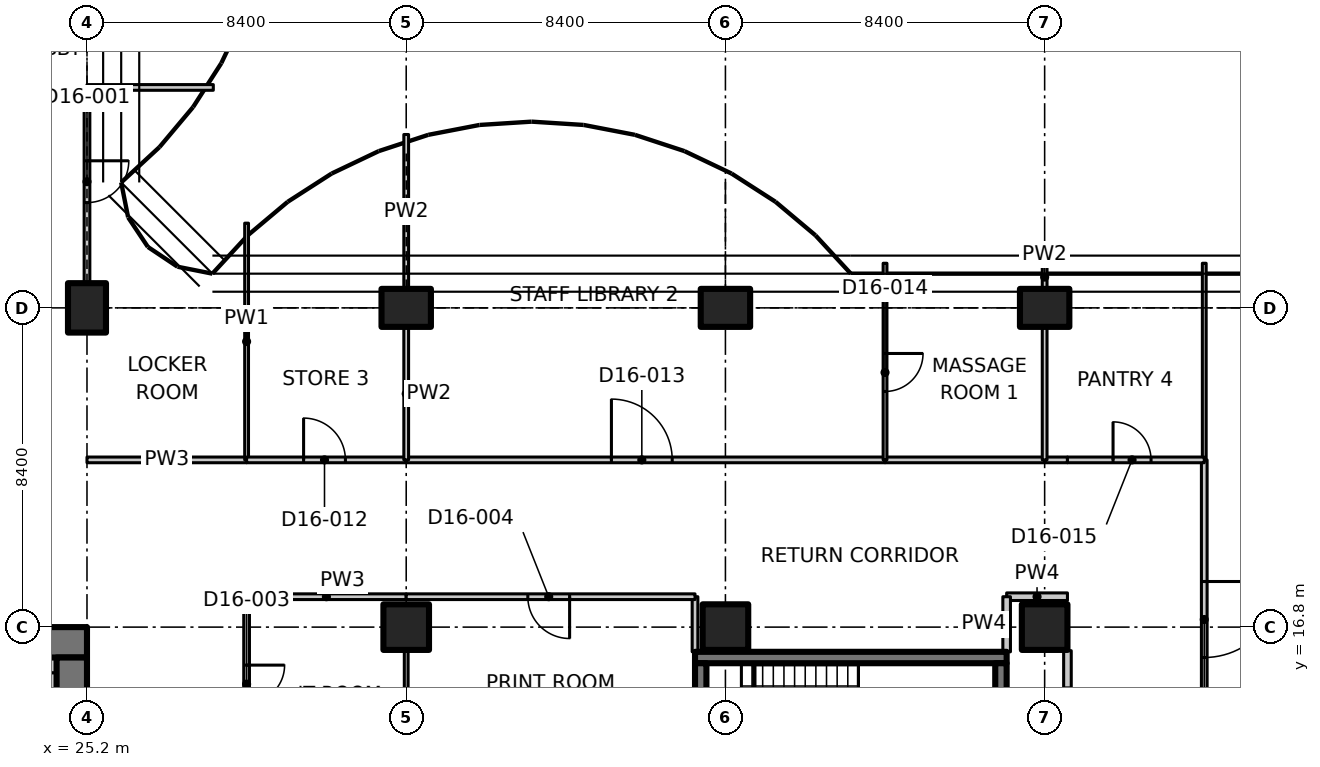
"""IFC4 building model, lengths in metres.
Left out: names, types, materials, properties, quantities, classifications, styles, units other than length and angle.
Written with IfcOpenShell. Run it as: python <this file> out.ifc"""

import sys

from ifc_helpers import new_model, si_unit, direction, frame, frame_2d, origin, origin_2d, place, context, subcontext, project, spatial, polyline, rectangle, outline, extrude, element, fill, save


model = new_model("IFC4")
c1 = context("Model", 3, precision=1e-05, world=origin(), true_north=direction((0.0, 1.0)))
c2 = subcontext(c1, "Body", "Model", "MODEL_VIEW")
j1 = project(units=[si_unit("LENGTHUNIT", "METRE"), si_unit("PLANEANGLEUNIT", "RADIAN")], contexts=[c1])
p1 = place(None, origin())
s1 = spatial("IfcSite", under=j1, at=p1, CompositionType="ELEMENT")
p2 = place(p1, origin())
s2 = spatial("IfcBuilding", under=s1, at=p2, CompositionType="ELEMENT")
p3 = place(p2, frame((0.0, 0.0, 124.1)))
s3 = spatial("IfcBuildingStorey", under=s2, at=p3, CompositionType="ELEMENT", Elevation=124.1)
p4 = place(p3, frame((25.2, 25.2, 0.0), z_axis=(0.0, 0.0, 1.0), x_axis=(1.0, 0.0, 0.0)))
e1 = element("IfcColumn", 1, at=p4, inside=s3, PredefinedType="COLUMN", context=c2, shape_type="SweptSolid", body=[
    extrude(rectangle(XDim=1.0, YDim=1.3, at=origin_2d()), origin(), (0.0, 0.0, 1.0), 3.35),
])
p5 = place(p3, frame((33.6, 16.8, 0.0), z_axis=(0.0, 0.0, 1.0), x_axis=(1.0, 0.0, 0.0)))
e2 = element("IfcColumn", 2, at=p5, inside=s3, PredefinedType="COLUMN", context=c2, shape_type="SweptSolid", body=[
    extrude(rectangle(XDim=1.2, YDim=1.2, at=origin_2d()), origin(), (0.0, 0.0, 1.0), 3.35),
])
p6 = place(p3, frame((33.6, 25.2, 0.0), z_axis=(0.0, 0.0, 1.0), x_axis=(0.0, 1.0, 0.0)))
e3 = element("IfcColumn", 3, at=p6, inside=s3, PredefinedType="COLUMN", context=c2, shape_type="SweptSolid", body=[
    extrude(rectangle(XDim=1.0, YDim=1.3, at=origin_2d()), origin(), (0.0, 0.0, 1.0), 3.35),
])
p7 = place(p3, frame((42.0, 16.8, 0.0), z_axis=(0.0, 0.0, 1.0), x_axis=(1.0, 0.0, 0.0)))
e4 = element("IfcColumn", 4, at=p7, inside=s3, PredefinedType="COLUMN", context=c2, shape_type="SweptSolid", body=[
    extrude(rectangle(XDim=1.2, YDim=1.2, at=origin_2d()), origin(), (0.0, 0.0, 1.0), 3.35),
])
p8 = place(p3, frame((42.0, 25.2, 0.0), z_axis=(0.0, 0.0, 1.0), x_axis=(0.0, 1.0, 0.0)))
e5 = element("IfcColumn", 5, at=p8, inside=s3, PredefinedType="COLUMN", context=c2, shape_type="SweptSolid", body=[
    extrude(rectangle(XDim=1.0, YDim=1.3, at=origin_2d()), origin(), (0.0, 0.0, 1.0), 3.35),
])
p9 = place(p3, frame((50.4, 16.8, 0.0), z_axis=(0.0, 0.0, 1.0), x_axis=(1.0, 0.0, 0.0)))
e6 = element("IfcColumn", 6, at=p9, inside=s3, PredefinedType="COLUMN", context=c2, shape_type="SweptSolid", body=[
    extrude(rectangle(XDim=1.2, YDim=1.2, at=origin_2d()), origin(), (0.0, 0.0, 1.0), 3.35),
])
p10 = place(p3, frame((50.4, 25.2, 0.0), z_axis=(0.0, 0.0, 1.0), x_axis=(0.0, 1.0, 0.0)))
e7 = element("IfcColumn", 7, at=p10, inside=s3, PredefinedType="COLUMN", context=c2, shape_type="SweptSolid", body=[
    extrude(rectangle(XDim=1.0, YDim=1.3, at=origin_2d()), origin(), (0.0, 0.0, 1.0), 3.35),
])
p11 = place(p3, frame((23.8, 16.4, 0.0), z_axis=(0.0, 0.0, 1.0), x_axis=(1.0, 0.0, 0.0)))
e8 = element("IfcWall", 8, at=p11, inside=s3, PredefinedType="SHEAR", context=c2, shape_type="SweptSolid", body=[
    extrude(rectangle(XDim=1.4, YDim=0.8, at=frame_2d((0.7, 0.0))), origin(), (0.0, 0.0, 1.0), 3.35),
])
p12 = place(p3, frame((24.8, 12.6, 0.0), z_axis=(0.0, 0.0, 1.0), x_axis=(0.0, 1.0, 0.0)))
e9 = element("IfcWall", 9, at=p12, inside=s3, PredefinedType="SHEAR", context=c2, shape_type="SweptSolid", body=[
    extrude(rectangle(XDim=3.4, YDim=0.8, at=frame_2d((1.7, 0.0))), origin(), (0.0, 0.0, 1.0), 3.35),
])
p13 = place(p3, frame((24.2, 12.6, 0.0), z_axis=(0.0, 0.0, 1.0), x_axis=(0.0, 1.0, 0.0)))
e10 = element("IfcWall", 10, at=p13, inside=s3, PredefinedType="PARTITIONING", context=c2, shape_type="SweptSolid", body=[
    extrude(rectangle(XDim=3.0, YDim=0.4, at=frame_2d((1.5, 0.0))), origin(), (0.0, 0.0, 1.0), 3.35),
])
p14 = place(p3, frame((23.8, 15.8, 0.0), z_axis=(0.0, 0.0, 1.0), x_axis=(1.0, 0.0, 0.0)))
e11 = element("IfcWall", 11, at=p14, inside=s3, PredefinedType="PARTITIONING", context=c2, shape_type="SweptSolid", body=[
    extrude(rectangle(XDim=0.6, YDim=0.4, at=frame_2d((0.3, 0.0))), origin(), (0.0, 0.0, 1.0), 3.35),
])
p15 = place(p3, frame((41.2, 16.0, 0.0), z_axis=(0.0, 0.0, 1.0), x_axis=(1.0, 0.0, 0.0)))
e12 = element("IfcWall", 12, at=p15, inside=s3, PredefinedType="SHEAR", context=c2, shape_type="SweptSolid", body=[
    extrude(rectangle(XDim=8.2, YDim=0.3, at=frame_2d((4.1, 0.0))), origin(), (0.0, 0.0, 1.0), 3.35),
])
for number, where, z_axis, x_axis in (
    (13, (41.35, 13.3, 0.0), (0.0, 0.0, 1.0), (0.0, 1.0, 0.0)),
    (14, (49.25, 13.3, 0.0), (0.0, 0.0, 1.0), (0.0, 1.0, 0.0)),
):
    element("IfcWall", number, at=place(p3, frame(where, z_axis=z_axis, x_axis=x_axis)), inside=s3, PredefinedType="SHEAR", context=c2, shape_type="SweptSolid", body=[
        extrude(rectangle(XDim=2.55, YDim=0.3, at=frame_2d((1.275, 0.0))), origin(), (0.0, 0.0, 1.0), 3.35),
    ])
p16 = place(p3, frame((25.2, 21.2, 0.0), z_axis=(0.0, 0.0, 1.0), x_axis=(1.0, 0.0, 0.0)))
e15 = element("IfcWall", 15, at=p16, inside=s3, PredefinedType="PARTITIONING", context=c2, shape_type="SweptSolid", body=[
    extrude(rectangle(XDim=4.2, YDim=0.15, at=frame_2d((2.1, 0.0))), origin(), (0.0, 0.0, 1.0), 3.33),
])
p17 = place(p3, frame((29.4, 17.6, 0.0), z_axis=(0.0, 0.0, 1.0), x_axis=(0.0, -1.0, 0.0)))
e16 = element("IfcWall", 16, at=p17, inside=s3, PredefinedType="PARTITIONING", context=c2, shape_type="SweptSolid", body=[
    extrude(rectangle(XDim=4.6, YDim=0.15, at=frame_2d((2.3, 0.0))), origin(), (0.0, 0.0, 1.0), 3.33),
])
p18 = place(p17, frame((1.8, 0.0, 0.0)))
e17 = element("IfcOpeningElement", 17, at=p18, cuts=e16, PredefinedType="OPENING", context=c2, shape_type="SweptSolid", body=[
    extrude(rectangle(XDim=1.0, YDim=2.1, at=frame_2d((0.5, 1.05))), frame((0.0, 0.085, 0.0), z_axis=(0.0, -1.0, 0.0), x_axis=(1.0, 0.0, 0.0)), (0.0, 0.0, 1.0), 0.17),
])
p19 = place(p3, frame((29.4, 27.429, 0.0), z_axis=(0.0, 0.0, 1.0), x_axis=(0.0, -1.0, 0.0)))
e18 = element("IfcWall", 18, at=p19, inside=s3, PredefinedType="PARTITIONING", context=c2, shape_type="SweptSolid", body=[
    extrude(outline(polyline([(0.0, 0.0), (6.229, 0.0), (6.229, 3.33), (2.679, 3.33), (2.677, 2.98), (1.781, 2.98), (1.779, 3.33), (0.154, 3.33), (0.0, 3.33), (0.0, 0.0)])), frame((0.0, 0.05, 0.0), z_axis=(0.0, -1.0, 0.0), x_axis=(1.0, 0.0, 0.0)), (0.0, 0.0, 1.0), 0.1),
])
p20 = place(p3, frame((25.2, 31.0, 0.0), z_axis=(0.0, 0.0, 1.0), x_axis=(0.0, -1.0, 0.0)))
e19 = element("IfcWall", 19, at=p20, inside=s3, PredefinedType="PARTITIONING", context=c2, shape_type="SweptSolid", body=[
    extrude(outline(polyline([(0.0, 0.0), (5.13, 0.0), (5.13, 2.98), (0.0, 2.98), (0.0, 0.0)])), frame((0.0, 0.075, 0.0), z_axis=(0.0, -1.0, 0.0), x_axis=(1.0, 0.0, 0.0)), (0.0, 0.0, 1.0), 0.15),
])
p21 = place(p20, frame((1.93, 0.0, 0.0)))
e20 = element("IfcOpeningElement", 20, at=p21, cuts=e19, PredefinedType="OPENING", context=c2, shape_type="SweptSolid", body=[
    extrude(rectangle(XDim=1.1, YDim=2.1, at=frame_2d((0.55, 1.05))), frame((0.0, 0.085, 0.0), z_axis=(0.0, -1.0, 0.0), x_axis=(1.0, 0.0, 0.0)), (0.0, 0.0, 1.0), 0.17),
])
p22 = place(p3, frame((25.2, 31.0, 0.0), z_axis=(0.0, 0.0, 1.0), x_axis=(1.0, 0.0, 0.0)))
e21 = element("IfcWall", 21, at=p22, inside=s3, PredefinedType="PARTITIONING", context=c2, shape_type="SweptSolid", body=[
    extrude(rectangle(XDim=3.324, YDim=0.15, at=frame_2d((1.662, 0.0))), origin(), (0.0, 0.0, 1.0), 2.98),
])
p23 = place(p3, frame((54.6, 21.2, 0.0), z_axis=(0.0, 0.0, 1.0), x_axis=(0.0, -1.0, 0.0)))
e22 = element("IfcWall", 22, at=p23, inside=s3, PredefinedType="PARTITIONING", context=c2, shape_type="SweptSolid", body=[
    extrude(rectangle(XDim=8.2, YDim=0.15, at=frame_2d((4.1, 0.0))), origin(), (0.0, 0.0, 1.0), 3.33),
])
p24 = place(p23, frame((3.2, 0.0, 0.0)))
e23 = element("IfcOpeningElement", 23, at=p24, cuts=e22, PredefinedType="OPENING", context=c2, shape_type="SweptSolid", body=[
    extrude(rectangle(XDim=2.0, YDim=2.4, at=frame_2d((1.0, 1.2))), frame((0.0, 0.085, 0.0), z_axis=(0.0, -1.0, 0.0), x_axis=(1.0, 0.0, 0.0)), (0.0, 0.0, 1.0), 0.17),
])
p25 = place(p3, frame((54.6, 21.2, 0.0), z_axis=(0.0, 0.0, 1.0), x_axis=(0.0, 1.0, 0.0)))
e24 = element("IfcWall", 24, at=p25, inside=s3, PredefinedType="PARTITIONING", context=c2, shape_type="SweptSolid", body=[
    extrude(outline(polyline([(0.0, 0.0), (5.174, 0.0), (5.174, 3.33), (5.1, 3.33), (4.45, 3.33), (4.448, 2.98), (3.552, 2.98), (3.55, 3.33), (0.0, 3.33), (0.0, 0.0)])), frame((0.0, 0.05, 0.0), z_axis=(0.0, -1.0, 0.0), x_axis=(1.0, 0.0, 0.0)), (0.0, 0.0, 1.0), 0.1),
])
p26 = place(p3, frame((33.6, 17.6, 0.0), z_axis=(0.0, 0.0, 1.0), x_axis=(-1.0, 0.0, 0.0)))
e25 = element("IfcWall", 25, at=p26, inside=s3, PredefinedType="PARTITIONING", context=c2, shape_type="SweptSolid", body=[
    extrude(rectangle(XDim=4.2, YDim=0.15, at=frame_2d((2.1, 0.0))), origin(), (0.0, 0.0, 1.0), 3.33),
])
p27 = place(p3, frame((41.2, 16.15, 0.0), z_axis=(0.0, 0.0, 1.0), x_axis=(0.0, 1.0, 0.0)))
e26 = element("IfcWall", 26, at=p27, inside=s3, PredefinedType="PARTITIONING", context=c2, shape_type="SweptSolid", body=[
    extrude(rectangle(XDim=1.45, YDim=0.15, at=frame_2d((0.725, 0.0))), origin(), (0.0, 0.0, 1.0), 3.33),
])
p28 = place(p3, frame((41.2, 17.6, 0.0), z_axis=(0.0, 0.0, 1.0), x_axis=(-1.0, 0.0, 0.0)))
e27 = element("IfcWall", 27, at=p28, inside=s3, PredefinedType="PARTITIONING", context=c2, shape_type="SweptSolid", body=[
    extrude(rectangle(XDim=7.6, YDim=0.15, at=frame_2d((3.8, 0.0))), origin(), (0.0, 0.0, 1.0), 3.33),
])
p29 = place(p28, frame((3.3, 0.0, 0.0)))
e28 = element("IfcOpeningElement", 28, at=p29, cuts=e27, PredefinedType="OPENING", context=c2, shape_type="SweptSolid", body=[
    extrude(rectangle(XDim=1.1, YDim=2.1, at=frame_2d((0.55, 1.05))), frame((0.0, 0.085, 0.0), z_axis=(0.0, -1.0, 0.0), x_axis=(1.0, 0.0, 0.0)), (0.0, 0.0, 1.0), 0.17),
])
p30 = place(p3, frame((51.0, 17.6, 0.0), z_axis=(0.0, 0.0, 1.0), x_axis=(-1.0, 0.0, 0.0)))
e29 = element("IfcWall", 29, at=p30, inside=s3, PredefinedType="PARTITIONING", context=c2, shape_type="SweptSolid", body=[
    extrude(rectangle(XDim=1.6, YDim=0.2, at=frame_2d((0.8, 0.0))), origin(), (0.0, 0.0, 1.0), 3.33),
])
p31 = place(p3, frame((49.4, 17.6, 0.0), z_axis=(0.0, 0.0, 1.0), x_axis=(0.0, -1.0, 0.0)))
e30 = element("IfcWall", 30, at=p31, inside=s3, PredefinedType="PARTITIONING", context=c2, shape_type="SweptSolid", body=[
    extrude(rectangle(XDim=1.45, YDim=0.2, at=frame_2d((0.725, 0.0))), origin(), (0.0, 0.0, 1.0), 3.33),
])
p32 = place(p3, frame((29.4, 21.2, 0.0), z_axis=(0.0, 0.0, 1.0), x_axis=(1.0, 0.0, 0.0)))
e31 = element("IfcWall", 31, at=p32, inside=s3, PredefinedType="PARTITIONING", context=c2, shape_type="SweptSolid", body=[
    extrude(rectangle(XDim=4.2, YDim=0.15, at=frame_2d((2.1, 0.0))), origin(), (0.0, 0.0, 1.0), 3.33),
])
p33 = place(p32, frame((1.5, 0.0, 0.0)))
e32 = element("IfcOpeningElement", 32, at=p33, cuts=e31, PredefinedType="OPENING", context=c2, shape_type="SweptSolid", body=[
    extrude(rectangle(XDim=1.1, YDim=2.1, at=frame_2d((0.55, 1.05))), frame((0.0, 0.085, 0.0), z_axis=(0.0, -1.0, 0.0), x_axis=(1.0, 0.0, 0.0)), (0.0, 0.0, 1.0), 0.17),
])
p34 = place(p3, frame((33.6, 21.2, 0.0), z_axis=(0.0, 0.0, 1.0), x_axis=(1.0, 0.0, 0.0)))
e33 = element("IfcWall", 33, at=p34, inside=s3, PredefinedType="PARTITIONING", context=c2, shape_type="SweptSolid", body=[
    extrude(rectangle(XDim=12.6, YDim=0.15, at=frame_2d((6.3, 0.0))), origin(), (0.0, 0.0, 1.0), 3.33),
])
p35 = place(p34, frame((5.4, 0.0, 0.0)))
e34 = element("IfcOpeningElement", 34, at=p35, cuts=e33, PredefinedType="OPENING", context=c2, shape_type="SweptSolid", body=[
    extrude(rectangle(XDim=1.6, YDim=2.1, at=frame_2d((0.8, 1.05))), frame((0.0, 0.085, 0.0), z_axis=(0.0, -1.0, 0.0), x_axis=(1.0, 0.0, 0.0)), (0.0, 0.0, 1.0), 0.17),
])
p36 = place(p3, frame((46.2, 21.2, 0.0), z_axis=(0.0, 0.0, 1.0), x_axis=(1.0, 0.0, 0.0)))
e35 = element("IfcWall", 35, at=p36, inside=s3, PredefinedType="PARTITIONING", context=c2, shape_type="SweptSolid", body=[
    extrude(rectangle(XDim=4.2, YDim=0.15, at=frame_2d((2.1, 0.0))), origin(), (0.0, 0.0, 1.0), 3.33),
])
p37 = place(p3, frame((50.4, 21.2, 0.0), z_axis=(0.0, 0.0, 1.0), x_axis=(1.0, 0.0, 0.0)))
e36 = element("IfcWall", 36, at=p37, inside=s3, PredefinedType="PARTITIONING", context=c2, shape_type="SweptSolid", body=[
    extrude(rectangle(XDim=0.6, YDim=0.15, at=frame_2d((0.3, 0.0))), origin(), (0.0, 0.0, 1.0), 3.33),
])
p38 = place(p3, frame((51.0, 13.0, 0.0), z_axis=(0.0, 0.0, 1.0), x_axis=(0.0, 1.0, 0.0)))
e37 = element("IfcWall", 37, at=p38, inside=s3, PredefinedType="PARTITIONING", context=c2, shape_type="SweptSolid", body=[
    extrude(rectangle(XDim=3.18, YDim=0.2, at=frame_2d((1.59, 0.0))), origin(), (0.0, 0.0, 1.0), 3.33),
])
p39 = place(p38, frame((1.2, 0.0, 0.0)))
e38 = element("IfcOpeningElement", 38, at=p39, cuts=e37, PredefinedType="OPENING", context=c2, shape_type="SweptSolid", body=[
    extrude(rectangle(XDim=1.0, YDim=2.1, at=frame_2d((0.5, 1.05))), frame((0.0, 0.11, 0.0), z_axis=(0.0, -1.0, 0.0), x_axis=(1.0, 0.0, 0.0)), (0.0, 0.0, 1.0), 0.22),
])
p40 = place(p3, frame((51.0, 21.2, 0.0), z_axis=(0.0, 0.0, 1.0), x_axis=(1.0, 0.0, 0.0)))
e39 = element("IfcWall", 39, at=p40, inside=s3, PredefinedType="PARTITIONING", context=c2, shape_type="SweptSolid", body=[
    extrude(rectangle(XDim=3.6, YDim=0.15, at=frame_2d((1.8, 0.0))), origin(), (0.0, 0.0, 1.0), 3.33),
])
p41 = place(p40, frame((1.2, 0.0, 0.0)))
e40 = element("IfcOpeningElement", 40, at=p41, cuts=e39, PredefinedType="OPENING", context=c2, shape_type="SweptSolid", body=[
    extrude(rectangle(XDim=1.0, YDim=2.1, at=frame_2d((0.5, 1.05))), frame((0.0, 0.085, 0.0), z_axis=(0.0, -1.0, 0.0), x_axis=(1.0, 0.0, 0.0)), (0.0, 0.0, 1.0), 0.17),
])
p42 = place(p3, frame((33.6, 16.18, 0.0), z_axis=(0.0, 0.0, 1.0), x_axis=(0.0, -1.0, 0.0)))
e41 = element("IfcWall", 41, at=p42, inside=s3, PredefinedType="PARTITIONING", context=c2, shape_type="SweptSolid", body=[
    extrude(rectangle(XDim=3.18, YDim=0.1, at=frame_2d((1.59, 0.0))), origin(), (0.0, 0.0, 1.0), 3.33),
])
p43 = place(p3, frame((33.6, 29.762, 0.0), z_axis=(0.0, 0.0, 1.0), x_axis=(0.0, -1.0, 0.0)))
e42 = element("IfcWall", 42, at=p43, inside=s3, PredefinedType="PARTITIONING", context=c2, shape_type="SweptSolid", body=[
    extrude(rectangle(XDim=4.042, YDim=0.125, at=frame_2d((2.021, 0.0))), origin(), (0.0, 0.0, 1.0), 2.98),
])
p44 = place(p3, frame((33.6, 24.68, 0.0), z_axis=(0.0, 0.0, 1.0), x_axis=(0.0, -1.0, 0.0)))
e43 = element("IfcWall", 43, at=p44, inside=s3, PredefinedType="PARTITIONING", context=c2, shape_type="SweptSolid", body=[
    extrude(rectangle(XDim=3.48, YDim=0.125, at=frame_2d((1.74, 0.0))), origin(), (0.0, 0.0, 1.0), 3.33),
])
p45 = place(p3, frame((46.2, 26.374, 0.0), z_axis=(0.0, 0.0, 1.0), x_axis=(0.0, -1.0, 0.0)))
e44 = element("IfcWall", 44, at=p45, inside=s3, PredefinedType="PARTITIONING", context=c2, shape_type="SweptSolid", body=[
    extrude(outline(polyline([(0.0, 0.0), (5.174, 0.0), (5.174, 3.33), (1.624, 3.33), (1.622, 2.98), (0.726, 2.98), (0.724, 3.33), (0.074, 3.33), (0.0, 3.33), (0.0, 0.0)])), frame((0.0, 0.05, 0.0), z_axis=(0.0, -1.0, 0.0), x_axis=(1.0, 0.0, 0.0)), (0.0, 0.0, 1.0), 0.1),
])
p46 = place(p45, frame((2.374, 0.0, 0.0)))
e45 = element("IfcOpeningElement", 45, at=p46, cuts=e44, PredefinedType="OPENING", context=c2, shape_type="SweptSolid", body=[
    extrude(rectangle(XDim=1.0, YDim=2.1, at=frame_2d((0.5, 1.05))), frame((0.0, 0.06, 0.0), z_axis=(0.0, -1.0, 0.0), x_axis=(1.0, 0.0, 0.0)), (0.0, 0.0, 1.0), 0.12),
])
p47 = place(p3, frame((50.4, 26.3, 0.0), z_axis=(0.0, 0.0, 1.0), x_axis=(0.0, -1.0, 0.0)))
e46 = element("IfcWall", 46, at=p47, inside=s3, PredefinedType="PARTITIONING", context=c2, shape_type="SweptSolid", body=[
    extrude(rectangle(XDim=0.58, YDim=0.125, at=frame_2d((0.29, 0.0))), origin(), (0.0, 0.0, 1.0), 3.33),
])
p48 = place(p3, frame((50.4, 24.68, 0.0), z_axis=(0.0, 0.0, 1.0), x_axis=(0.0, -1.0, 0.0)))
e47 = element("IfcWall", 47, at=p48, inside=s3, PredefinedType="PARTITIONING", context=c2, shape_type="SweptSolid", body=[
    extrude(rectangle(XDim=3.48, YDim=0.125, at=frame_2d((1.74, 0.0))), origin(), (0.0, 0.0, 1.0), 3.33),
])
p49 = place(p21, origin())
e48 = element("IfcDoor", 48, at=p49, inside=s3, OperationType="SINGLE_SWING_RIGHT", PredefinedType="DOOR", context=c2, shape_type="SweptSolid", body=[
    extrude(rectangle(XDim=1.1, YDim=2.1, at=frame_2d((0.55, 1.05))), frame((0.0, 0.025, 0.0), z_axis=(0.0, -1.0, 0.0), x_axis=(1.0, 0.0, 0.0)), (0.0, 0.0, 1.0), 0.05),
])
fill(e20, e48)
p50 = place(p24, origin())
e49 = element("IfcDoor", 49, at=p50, inside=s3, OperationType="DOUBLE_DOOR_SINGLE_SWING", PredefinedType="DOOR", context=c2, shape_type="SweptSolid", body=[
    extrude(rectangle(XDim=2.0, YDim=2.4, at=frame_2d((1.0, 1.2))), frame((0.0, 0.025, 0.0), z_axis=(0.0, -1.0, 0.0), x_axis=(1.0, 0.0, 0.0)), (0.0, 0.0, 1.0), 0.05),
])
fill(e23, e49)
p51 = place(p18, origin())
e50 = element("IfcDoor", 50, at=p51, inside=s3, OperationType="SINGLE_SWING_LEFT", PredefinedType="DOOR", context=c2, shape_type="SweptSolid", body=[
    extrude(rectangle(XDim=1.0, YDim=2.1, at=frame_2d((0.5, 1.05))), frame((0.0, 0.025, 0.0), z_axis=(0.0, -1.0, 0.0), x_axis=(1.0, 0.0, 0.0)), (0.0, 0.0, 1.0), 0.05),
])
fill(e17, e50)
p52 = place(p29, origin())
e51 = element("IfcDoor", 51, at=p52, inside=s3, OperationType="SINGLE_SWING_LEFT", PredefinedType="DOOR", context=c2, shape_type="SweptSolid", body=[
    extrude(rectangle(XDim=1.1, YDim=2.1, at=frame_2d((0.55, 1.05))), frame((0.0, 0.025, 0.0), z_axis=(0.0, -1.0, 0.0), x_axis=(1.0, 0.0, 0.0)), (0.0, 0.0, 1.0), 0.05),
])
fill(e28, e51)
p53 = place(p33, origin())
e52 = element("IfcDoor", 52, at=p53, inside=s3, OperationType="SINGLE_SWING_LEFT", PredefinedType="DOOR", context=c2, shape_type="SweptSolid", body=[
    extrude(rectangle(XDim=1.1, YDim=2.1, at=frame_2d((0.55, 1.05))), frame((0.0, 0.025, 0.0), z_axis=(0.0, -1.0, 0.0), x_axis=(1.0, 0.0, 0.0)), (0.0, 0.0, 1.0), 0.05),
])
fill(e32, e52)
p54 = place(p35, origin())
e53 = element("IfcDoor", 53, at=p54, inside=s3, OperationType="DOUBLE_DOOR_SINGLE_SWING", PredefinedType="DOOR", context=c2, shape_type="SweptSolid", body=[
    extrude(rectangle(XDim=1.6, YDim=2.1, at=frame_2d((0.8, 1.05))), frame((0.0, 0.025, 0.0), z_axis=(0.0, -1.0, 0.0), x_axis=(1.0, 0.0, 0.0)), (0.0, 0.0, 1.0), 0.05),
])
fill(e34, e53)
p55 = place(p46, origin())
e54 = element("IfcDoor", 54, at=p55, inside=s3, OperationType="SINGLE_SWING_LEFT", PredefinedType="DOOR", context=c2, shape_type="SweptSolid", body=[
    extrude(rectangle(XDim=1.0, YDim=2.1, at=frame_2d((0.5, 1.05))), frame((0.0, 0.025, 0.0), z_axis=(0.0, -1.0, 0.0), x_axis=(1.0, 0.0, 0.0)), (0.0, 0.0, 1.0), 0.05),
])
fill(e45, e54)
p56 = place(p41, origin())
e55 = element("IfcDoor", 55, at=p56, inside=s3, OperationType="SINGLE_SWING_LEFT", PredefinedType="DOOR", context=c2, shape_type="SweptSolid", body=[
    extrude(rectangle(XDim=1.0, YDim=2.1, at=frame_2d((0.5, 1.05))), frame((0.0, 0.025, 0.0), z_axis=(0.0, -1.0, 0.0), x_axis=(1.0, 0.0, 0.0)), (0.0, 0.0, 1.0), 0.05),
])
fill(e40, e55)
save(model, sys.argv[1])
